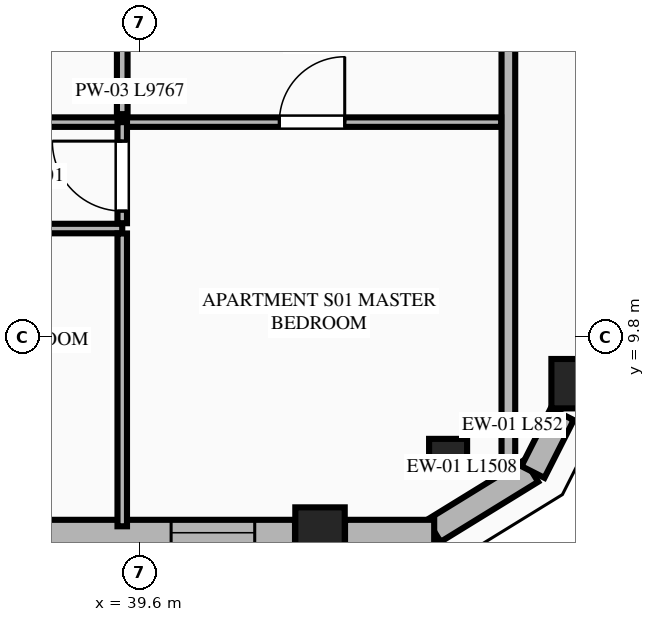
"""IFC4 building model, lengths in metres.
Left out: names, types, materials, properties, quantities, classifications, styles, units other than length and angle.
Written with IfcOpenShell. Run it as: python <this file> out.ifc"""

import sys

from ifc_helpers import new_model, si_unit, direction, frame, frame_2d, origin, origin_2d, place, context, subcontext, project, spatial, rectangle, extrude, element, fill, save


model = new_model("IFC4")
c1 = context("Model", 3, precision=1e-05, world=origin(), true_north=direction((0.0, 1.0)))
c2 = subcontext(c1, "Body", "Model", "MODEL_VIEW")
j1 = project(units=[si_unit("LENGTHUNIT", "METRE"), si_unit("PLANEANGLEUNIT", "RADIAN")], contexts=[c1])
p1 = place(None, origin())
s1 = spatial("IfcSite", under=j1, at=p1, CompositionType="ELEMENT")
p2 = place(p1, origin())
s2 = spatial("IfcBuilding", under=s1, at=p2, CompositionType="ELEMENT")
p3 = place(p2, frame((0.0, 0.0, 291.5)))
s3 = spatial("IfcBuildingStorey", under=s2, at=p3, CompositionType="ELEMENT", Elevation=291.5)
for number, where, z_axis, x_axis in (
    (1, (41.972, 7.239, 0.0), (0.0, 0.0, 1.0), (1.0, 0.0, 0.0)),
    (2, (45.341, 9.191, 0.0), (0.0, 0.0, 1.0), (1.0, 0.0, 0.0)),
):
    element("IfcColumn", number, at=place(p3, frame(where, z_axis=z_axis, x_axis=x_axis)), inside=s3, PredefinedType="COLUMN", context=c2, shape_type="SweptSolid", body=[
        extrude(rectangle(XDim=0.65, YDim=0.65, at=origin_2d()), origin(), (0.0, 0.0, 1.0), 4.0),
    ])
p4 = place(p3, frame((43.657, 8.215, 0.0), z_axis=(0.0, 0.0, 1.0), x_axis=(0.865256437757, 0.501329529272, 0.0)))
e3 = element("IfcColumn", 3, at=p4, inside=s3, PredefinedType="PILASTER", context=c2, shape_type="SweptSolid", body=[
    extrude(rectangle(XDim=0.5, YDim=0.35, at=origin_2d()), origin(), (0.0, 0.0, 1.0), 4.0),
])
p5 = place(p3, frame((43.469, 7.255, 0.0), z_axis=(0.0, 0.0, 1.0), x_axis=(0.851680557619, 0.52406128246, 0.0)))
e4 = element("IfcWall", 4, at=p5, inside=s3, PredefinedType="STANDARD", context=c2, shape_type="SweptSolid", body=[
    extrude(rectangle(XDim=1.508, YDim=0.34, at=frame_2d((0.754, 0.0))), origin(), (0.0, 0.0, 1.0), 3.8),
])
p6 = place(p3, frame((35.983, 7.23, 0.0), z_axis=(0.0, 0.0, 1.0), x_axis=(1.0, 0.0, 0.0)))
e5 = element("IfcWall", 5, at=p6, inside=s3, PredefinedType="STANDARD", context=c2, shape_type="SweptSolid", body=[
    extrude(rectangle(XDim=5.66, YDim=0.34, at=frame_2d((2.83, 0.0))), origin(), (0.0, 0.0, 1.0), 2.99),
])
p7 = place(p6, frame((1.087, 0.0, 0.75)))
e6 = element("IfcOpeningElement", 6, at=p7, cuts=e5, PredefinedType="OPENING", context=c2, shape_type="SweptSolid", body=[
    extrude(rectangle(XDim=1.1, YDim=2.0, at=frame_2d((0.55, 1.0))), frame((0.0, 0.18, 0.0), z_axis=(0.0, -1.0, 0.0), x_axis=(1.0, 0.0, 0.0)), (0.0, 0.0, 1.0), 0.36),
])
p8 = place(p6, frame((4.03, 0.0, 0.75)))
e7 = element("IfcOpeningElement", 7, at=p8, cuts=e5, PredefinedType="OPENING", context=c2, shape_type="SweptSolid", body=[
    extrude(rectangle(XDim=1.1, YDim=2.0, at=frame_2d((0.55, 1.0))), frame((0.0, 0.18, 0.0), z_axis=(0.0, -1.0, 0.0), x_axis=(1.0, 0.0, 0.0)), (0.0, 0.0, 1.0), 0.36),
])
p9 = place(p3, frame((42.301, 7.23, 0.0), z_axis=(0.0, 0.0, 1.0), x_axis=(1.0, 0.0, 0.0)))
e8 = element("IfcWall", 8, at=p9, inside=s3, PredefinedType="STANDARD", context=c2, shape_type="SweptSolid", body=[
    extrude(rectangle(XDim=1.173, YDim=0.34, at=frame_2d((0.586, 0.0))), origin(), (0.0, 0.0, 1.0), 3.8),
])
p10 = place(p3, frame((44.773, 8.029, 0.0), z_axis=(0.0, 0.0, 1.0), x_axis=(0.451907025977, 0.8920650424, 0.0)))
e9 = element("IfcWall", 9, at=p10, inside=s3, PredefinedType="STANDARD", context=c2, shape_type="SweptSolid", body=[
    extrude(rectangle(XDim=0.852, YDim=0.34, at=frame_2d((0.426, 0.0))), origin(), (0.0, 0.0, 1.0), 3.8),
])
p11 = place(p3, frame((44.45, 8.119, 0.0), z_axis=(0.0, 0.0, 1.0), x_axis=(0.0, 1.0, 0.0)))
e10 = element("IfcWall", 10, at=p11, inside=s3, PredefinedType="PARTITIONING", context=c2, shape_type="SweptSolid", body=[
    extrude(rectangle(XDim=8.281, YDim=0.18, at=frame_2d((4.141, 0.0))), origin(), (0.0, 0.0, 1.0), 3.8),
])
p12 = place(p3, frame((34.588, 12.632, 0.0), z_axis=(0.0, 0.0, 1.0), x_axis=(1.0, 0.0, 0.0)))
e11 = element("IfcWall", 11, at=p12, inside=s3, PredefinedType="PARTITIONING", context=c2, shape_type="SweptSolid", body=[
    extrude(rectangle(XDim=9.767, YDim=0.125, at=frame_2d((4.884, 0.0))), origin(), (0.0, 0.0, 1.0), 3.8),
])
p13 = place(p12, frame((6.849, 0.0, 0.0)))
e12 = element("IfcOpeningElement", 12, at=p13, cuts=e11, PredefinedType="OPENING", context=c2, shape_type="SweptSolid", body=[
    extrude(rectangle(XDim=0.86, YDim=2.1, at=frame_2d((0.43, 1.05))), frame((0.0, 0.073, 0.0), z_axis=(0.0, -1.0, 0.0), x_axis=(1.0, 0.0, 0.0)), (0.0, 0.0, 1.0), 0.145),
])
p14 = place(p12, frame((0.3, 0.0, 0.0)))
e13 = element("IfcOpeningElement", 13, at=p14, cuts=e11, PredefinedType="OPENING", context=c2, shape_type="SweptSolid", body=[
    extrude(rectangle(XDim=0.88, YDim=2.15, at=frame_2d((0.44, 1.075))), frame((0.0, 0.073, 0.0), z_axis=(0.0, -1.0, 0.0), x_axis=(1.0, 0.0, 0.0)), (0.0, 0.0, 1.0), 0.145),
])
p15 = place(p3, frame((29.508, 11.232, 0.0), z_axis=(0.0, 0.0, 1.0), x_axis=(1.0, 0.0, 0.0)))
e14 = element("IfcWall", 14, at=p15, inside=s3, PredefinedType="PARTITIONING", context=c2, shape_type="SweptSolid", body=[
    extrude(rectangle(XDim=9.862, YDim=0.125, at=frame_2d((4.931, 0.0))), origin(), (0.0, 0.0, 1.0), 3.8),
])
p16 = place(p15, frame((0.35, 0.0, 0.0)))
e15 = element("IfcOpeningElement", 15, at=p16, cuts=e14, PredefinedType="OPENING", context=c2, shape_type="SweptSolid", body=[
    extrude(rectangle(XDim=0.92, YDim=2.15, at=frame_2d((0.46, 1.075))), frame((0.0, 0.073, 0.0), z_axis=(0.0, -1.0, 0.0), x_axis=(1.0, 0.0, 0.0)), (0.0, 0.0, 1.0), 0.145),
])
p17 = place(p15, frame((5.43, 0.0, 0.0)))
e16 = element("IfcOpeningElement", 16, at=p17, cuts=e14, PredefinedType="OPENING", context=c2, shape_type="SweptSolid", body=[
    extrude(rectangle(XDim=0.92, YDim=2.15, at=frame_2d((0.46, 1.075))), frame((0.0, 0.073, 0.0), z_axis=(0.0, -1.0, 0.0), x_axis=(1.0, 0.0, 0.0)), (0.0, 0.0, 1.0), 0.145),
])
p18 = place(p3, frame((39.37, 11.302, 0.0), z_axis=(0.0, 0.0, 1.0), x_axis=(0.0, 1.0, 0.0)))
e17 = element("IfcWall", 17, at=p18, inside=s3, PredefinedType="PARTITIONING", context=c2, shape_type="SweptSolid", body=[
    extrude(rectangle(XDim=1.33, YDim=0.125, at=frame_2d((0.665, 0.0))), origin(), (0.0, 0.0, 1.0), 3.8),
])
p19 = place(p18, frame((0.16, 0.0, 0.0)))
e18 = element("IfcOpeningElement", 18, at=p19, cuts=e17, PredefinedType="OPENING", context=c2, shape_type="SweptSolid", body=[
    extrude(rectangle(XDim=0.92, YDim=2.15, at=frame_2d((0.46, 1.075))), frame((0.0, 0.073, 0.0), z_axis=(0.0, -1.0, 0.0), x_axis=(1.0, 0.0, 0.0)), (0.0, 0.0, 1.0), 0.145),
])
p20 = place(p3, frame((39.37, 7.315, 0.0), z_axis=(0.0, 0.0, 1.0), x_axis=(0.0, 1.0, 0.0)))
e19 = element("IfcWall", 19, at=p20, inside=s3, PredefinedType="PARTITIONING", context=c2, shape_type="SweptSolid", body=[
    extrude(rectangle(XDim=3.852, YDim=0.125, at=frame_2d((1.926, 0.0))), origin(), (0.0, 0.0, 1.0), 3.8),
])
p21 = place(p3, frame((39.37, 12.737, 0.0), z_axis=(0.0, 0.0, 1.0), x_axis=(0.0, 1.0, 0.0)))
e20 = element("IfcWall", 20, at=p21, inside=s3, PredefinedType="PLUMBINGWALL", context=c2, shape_type="SweptSolid", body=[
    extrude(rectangle(XDim=3.578, YDim=0.14, at=frame_2d((1.789, 0.0))), origin(), (0.0, 0.0, 1.0), 3.8),
])
p22 = place(p13, origin())
e21 = element("IfcDoor", 21, at=p22, inside=s3, OperationType="SINGLE_SWING_RIGHT", PredefinedType="DOOR", context=c2, shape_type="SweptSolid", body=[
    extrude(rectangle(XDim=0.86, YDim=2.1, at=frame_2d((0.43, 1.05))), frame((0.0, 0.025, 0.0), z_axis=(0.0, -1.0, 0.0), x_axis=(1.0, 0.0, 0.0)), (0.0, 0.0, 1.0), 0.05),
])
fill(e12, e21)
p23 = place(p19, origin())
e22 = element("IfcDoor", 22, at=p23, inside=s3, OperationType="SINGLE_SWING_RIGHT", PredefinedType="DOOR", context=c2, shape_type="SweptSolid", body=[
    extrude(rectangle(XDim=0.92, YDim=2.15, at=frame_2d((0.46, 1.075))), frame((0.0, 0.025, 0.0), z_axis=(0.0, -1.0, 0.0), x_axis=(1.0, 0.0, 0.0)), (0.0, 0.0, 1.0), 0.05),
])
fill(e18, e22)
p24 = place(p8, origin())
e23 = element("IfcWindow", 23, at=p24, inside=s3, PartitioningType="SINGLE_PANEL", PredefinedType="WINDOW", context=c2, shape_type="SweptSolid", body=[
    extrude(rectangle(XDim=1.1, YDim=2.0, at=frame_2d((0.55, 1.0))), frame((0.0, 0.03, 0.0), z_axis=(0.0, -1.0, 0.0), x_axis=(1.0, 0.0, 0.0)), (0.0, 0.0, 1.0), 0.06),
])
fill(e7, e23)
save(model, sys.argv[1])
